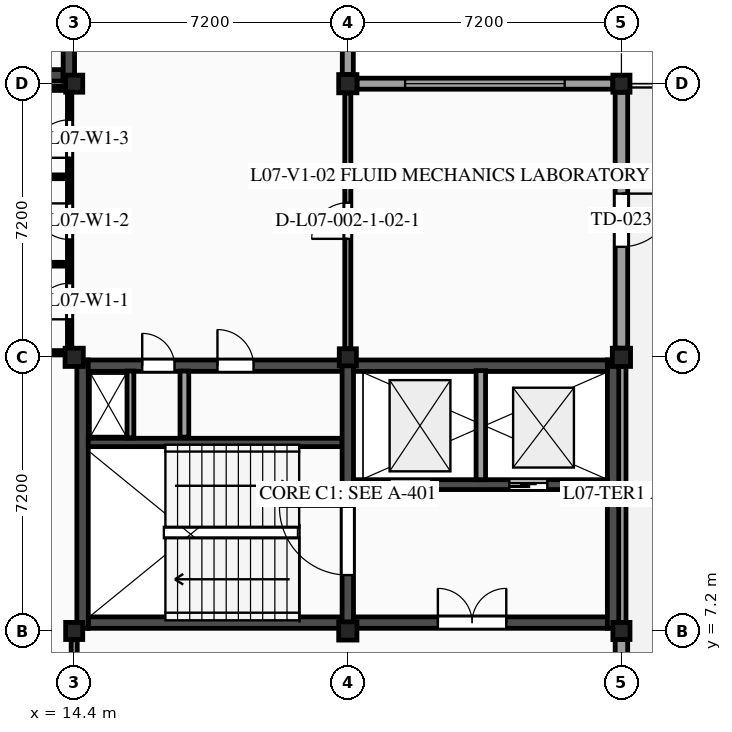
"""IFC4 building model, lengths in metres.
Left out: names, types, materials, properties, quantities, classifications, styles, units other than length and angle.
Written with IfcOpenShell. Run it as: python <this file> out.ifc"""

import sys

from ifc_helpers import new_model, si_unit, direction, frame, frame_2d, origin, origin_2d, place, context, subcontext, project, spatial, rectangle, extrude, element, fill, save


model = new_model("IFC4")
c1 = context("Model", 3, precision=1e-05, world=origin(), true_north=direction((0.0, 1.0)))
c2 = subcontext(c1, "Body", "Model", "MODEL_VIEW")
j1 = project(units=[si_unit("LENGTHUNIT", "METRE"), si_unit("PLANEANGLEUNIT", "RADIAN")], contexts=[c1])
p1 = place(None, origin())
s1 = spatial("IfcSite", under=j1, at=p1, CompositionType="ELEMENT")
p2 = place(p1, origin())
s2 = spatial("IfcBuilding", under=s1, at=p2, CompositionType="ELEMENT")
p3 = place(p2, frame((0.0, 0.0, 30.6)))
s3 = spatial("IfcBuildingStorey", under=s2, at=p3, CompositionType="ELEMENT", Elevation=30.6)
p4 = place(p3, frame((14.4, 7.2, 0.0), z_axis=(0.0, 0.0, 1.0), x_axis=(1.0, 0.0, 0.0)))
e1 = element("IfcColumn", 1, at=p4, inside=s3, PredefinedType="COLUMN", context=c2, shape_type="SweptSolid", body=[
    extrude(rectangle(XDim=0.45, YDim=0.45, at=origin_2d()), origin(), (0.0, 0.0, 1.0), 3.9),
])
p5 = place(p3, frame((14.4, 14.4, 0.0), z_axis=(0.0, 0.0, 1.0), x_axis=(1.0, 0.0, 0.0)))
e2 = element("IfcColumn", 2, at=p5, inside=s3, PredefinedType="COLUMN", context=c2, shape_type="SweptSolid", body=[
    extrude(rectangle(XDim=0.48, YDim=0.48, at=origin_2d()), origin(), (0.0, 0.0, 1.0), 3.9),
])
p6 = place(p3, frame((14.4, 21.6, 0.0), z_axis=(0.0, 0.0, 1.0), x_axis=(1.0, 0.0, 0.0)))
e3 = element("IfcColumn", 3, at=p6, inside=s3, PredefinedType="COLUMN", context=c2, shape_type="SweptSolid", body=[
    extrude(rectangle(XDim=0.45, YDim=0.45, at=origin_2d()), origin(), (0.0, 0.0, 1.0), 3.9),
])
p7 = place(p3, frame((21.6, 7.2, 0.0), z_axis=(0.0, 0.0, 1.0), x_axis=(1.0, 0.0, 0.0)))
e4 = element("IfcColumn", 4, at=p7, inside=s3, PredefinedType="COLUMN", context=c2, shape_type="SweptSolid", body=[
    extrude(rectangle(XDim=0.48, YDim=0.48, at=origin_2d()), origin(), (0.0, 0.0, 1.0), 3.9),
])
p8 = place(p3, frame((21.6, 14.4, 0.0), z_axis=(0.0, 0.0, 1.0), x_axis=(1.0, 0.0, 0.0)))
e5 = element("IfcColumn", 5, at=p8, inside=s3, PredefinedType="COLUMN", context=c2, shape_type="SweptSolid", body=[
    extrude(rectangle(XDim=0.45, YDim=0.45, at=origin_2d()), origin(), (0.0, 0.0, 1.0), 3.9),
])
p9 = place(p3, frame((21.6, 21.6, 0.0), z_axis=(0.0, 0.0, 1.0), x_axis=(1.0, 0.0, 0.0)))
e6 = element("IfcColumn", 6, at=p9, inside=s3, PredefinedType="COLUMN", context=c2, shape_type="SweptSolid", body=[
    extrude(rectangle(XDim=0.48, YDim=0.48, at=origin_2d()), origin(), (0.0, 0.0, 1.0), 3.9),
])
p10 = place(p3, frame((28.8, 7.2, 0.0), z_axis=(0.0, 0.0, 1.0), x_axis=(1.0, 0.0, 0.0)))
e7 = element("IfcColumn", 7, at=p10, inside=s3, PredefinedType="COLUMN", context=c2, shape_type="SweptSolid", body=[
    extrude(rectangle(XDim=0.45, YDim=0.45, at=origin_2d()), origin(), (0.0, 0.0, 1.0), 3.9),
])
p11 = place(p3, frame((28.8, 14.4, 0.0), z_axis=(0.0, 0.0, 1.0), x_axis=(1.0, 0.0, 0.0)))
e8 = element("IfcColumn", 8, at=p11, inside=s3, PredefinedType="COLUMN", context=c2, shape_type="SweptSolid", body=[
    extrude(rectangle(XDim=0.48, YDim=0.48, at=origin_2d()), origin(), (0.0, 0.0, 1.0), 3.9),
])
p12 = place(p3, frame((28.8, 21.6, 0.0), z_axis=(0.0, 0.0, 1.0), x_axis=(1.0, 0.0, 0.0)))
e9 = element("IfcColumn", 9, at=p12, inside=s3, PredefinedType="COLUMN", context=c2, shape_type="SweptSolid", body=[
    extrude(rectangle(XDim=0.45, YDim=0.45, at=origin_2d()), origin(), (0.0, 0.0, 1.0), 3.9),
])
p13 = place(p3, frame((21.6, 28.575, 0.0), z_axis=(0.0, 0.0, 1.0), x_axis=(0.0, -1.0, 0.0)))
e10 = element("IfcWall", 10, at=p13, inside=s3, PredefinedType="STANDARD", context=c2, shape_type="SweptSolid", body=[
    extrude(rectangle(XDim=6.735, YDim=0.29, at=frame_2d((3.367, 0.0))), origin(), (0.0, 0.0, 1.0), 2.88),
])
p14 = place(p13, frame((0.968, 0.0, 0.98)))
e11 = element("IfcOpeningElement", 11, at=p14, cuts=e10, PredefinedType="OPENING", context=c2, shape_type="SweptSolid", body=[
    extrude(rectangle(XDim=4.8, YDim=1.5, at=frame_2d((2.4, 0.75))), frame((0.0, 0.155, 0.0), z_axis=(0.0, -1.0, 0.0), x_axis=(1.0, 0.0, 0.0)), (0.0, 0.0, 1.0), 0.31),
])
p15 = place(p3, frame((21.84, 21.6, 0.0), z_axis=(0.0, 0.0, 1.0), x_axis=(1.0, 0.0, 0.0)))
e12 = element("IfcWall", 12, at=p15, inside=s3, PredefinedType="STANDARD", context=c2, shape_type="SweptSolid", body=[
    extrude(rectangle(XDim=6.735, YDim=0.29, at=frame_2d((3.367, 0.0))), origin(), (0.0, 0.0, 1.0), 2.88),
])
p16 = place(p15, frame((1.268, 0.0, 0.98)))
e13 = element("IfcOpeningElement", 13, at=p16, cuts=e12, PredefinedType="OPENING", context=c2, shape_type="SweptSolid", body=[
    extrude(rectangle(XDim=4.2, YDim=1.5, at=frame_2d((2.1, 0.75))), frame((0.0, 0.155, 0.0), z_axis=(0.0, -1.0, 0.0), x_axis=(1.0, 0.0, 0.0)), (0.0, 0.0, 1.0), 0.31),
])
p17 = place(p3, frame((28.8, 21.375, 0.0), z_axis=(0.0, 0.0, 1.0), x_axis=(0.0, -1.0, 0.0)))
e14 = element("IfcWall", 14, at=p17, inside=s3, PredefinedType="STANDARD", context=c2, shape_type="SweptSolid", body=[
    extrude(rectangle(XDim=6.735, YDim=0.33, at=frame_2d((3.368, 0.0))), origin(), (0.0, 0.0, 1.0), 2.88),
])
p18 = place(p17, frame((2.667, 0.0, 0.0)))
e15 = element("IfcOpeningElement", 15, at=p18, cuts=e14, PredefinedType="OPENING", context=c2, shape_type="SweptSolid", body=[
    extrude(rectangle(XDim=1.4, YDim=2.25, at=frame_2d((0.7, 1.125))), frame((0.0, 0.175, 0.0), z_axis=(0.0, -1.0, 0.0), x_axis=(1.0, 0.0, 0.0)), (0.0, 0.0, 1.0), 0.35),
])
p19 = place(p3, frame((28.8, 14.16, 0.0), z_axis=(0.0, 0.0, 1.0), x_axis=(0.0, -1.0, 0.0)))
e16 = element("IfcWall", 16, at=p19, inside=s3, PredefinedType="STANDARD", context=c2, shape_type="SweptSolid", body=[
    extrude(rectangle(XDim=6.735, YDim=0.24, at=frame_2d((3.367, 0.0))), origin(), (0.0, 0.0, 1.0), 2.88),
])
p20 = place(p3, frame((28.8, 6.975, 0.0), z_axis=(0.0, 0.0, 1.0), x_axis=(0.0, -1.0, 0.0)))
e17 = element("IfcWall", 17, at=p20, inside=s3, PredefinedType="STANDARD", context=c2, shape_type="SweptSolid", body=[
    extrude(rectangle(XDim=6.735, YDim=0.33, at=frame_2d((3.368, 0.0))), origin(), (0.0, 0.0, 1.0), 2.88),
])
p21 = place(p20, frame((2.817, 0.0, 0.0)))
e18 = element("IfcOpeningElement", 18, at=p21, cuts=e17, PredefinedType="OPENING", context=c2, shape_type="SweptSolid", body=[
    extrude(rectangle(XDim=1.1, YDim=2.2, at=frame_2d((0.55, 1.1))), frame((0.0, 0.175, 0.0), z_axis=(0.0, -1.0, 0.0), x_axis=(1.0, 0.0, 0.0)), (0.0, 0.0, 1.0), 0.35),
])
p22 = place(p3, frame((14.77, 7.42, 0.0), z_axis=(0.0, 0.0, 1.0), x_axis=(1.0, 0.0, 0.0)))
e19 = element("IfcWall", 19, at=p22, inside=s3, PredefinedType="SHEAR", context=c2, shape_type="SweptSolid", body=[
    extrude(rectangle(XDim=6.68, YDim=0.3, at=frame_2d((3.34, 0.0))), origin(), (0.0, 0.0, 1.0), 3.685),
])
p23 = place(p3, frame((14.62, 14.33, 0.0), z_axis=(0.0, 0.0, 1.0), x_axis=(0.0, -1.0, 0.0)))
e20 = element("IfcWall", 20, at=p23, inside=s3, PredefinedType="SHEAR", context=c2, shape_type="SweptSolid", body=[
    extrude(rectangle(XDim=7.06, YDim=0.3, at=frame_2d((3.53, 0.0))), origin(), (0.0, 0.0, 1.0), 3.685),
])
p24 = place(p3, frame((14.77, 14.18, 0.0), z_axis=(0.0, 0.0, 1.0), x_axis=(1.0, 0.0, 0.0)))
e21 = element("IfcWall", 21, at=p24, inside=s3, PredefinedType="SHEAR", context=c2, shape_type="SweptSolid", body=[
    extrude(rectangle(XDim=6.68, YDim=0.3, at=frame_2d((3.34, 0.0))), origin(), (0.0, 0.0, 1.0), 3.685),
])
p25 = place(p24, frame((1.42, 0.0, 0.0)))
e22 = element("IfcOpeningElement", 22, at=p25, cuts=e21, PredefinedType="OPENING", context=c2, shape_type="SweptSolid", body=[
    extrude(rectangle(XDim=0.85, YDim=2.1, at=frame_2d((0.425, 1.05))), frame((0.0, 0.16, 0.0), z_axis=(0.0, -1.0, 0.0), x_axis=(1.0, 0.0, 0.0)), (0.0, 0.0, 1.0), 0.32),
])
p26 = place(p24, frame((3.4, 0.0, 0.0)))
e23 = element("IfcOpeningElement", 23, at=p26, cuts=e21, PredefinedType="OPENING", context=c2, shape_type="SweptSolid", body=[
    extrude(rectangle(XDim=0.95, YDim=2.15, at=frame_2d((0.475, 1.075))), frame((0.0, 0.16, 0.0), z_axis=(0.0, -1.0, 0.0), x_axis=(1.0, 0.0, 0.0)), (0.0, 0.0, 1.0), 0.32),
])
p27 = place(p3, frame((14.77, 12.16, 0.0), z_axis=(0.0, 0.0, 1.0), x_axis=(1.0, 0.0, 0.0)))
e24 = element("IfcWall", 24, at=p27, inside=s3, PredefinedType="SHEAR", context=c2, shape_type="SweptSolid", body=[
    extrude(rectangle(XDim=6.68, YDim=0.22, at=frame_2d((3.34, 0.0))), origin(), (0.0, 0.0, 1.0), 3.685),
])
p28 = place(p3, frame((17.3, 12.3, 0.0), z_axis=(0.0, 0.0, 1.0), x_axis=(0.0, 1.0, 0.0)))
e25 = element("IfcWall", 25, at=p28, inside=s3, PredefinedType="PARTITIONING", context=c2, shape_type="SweptSolid", body=[
    extrude(rectangle(XDim=1.74, YDim=0.23, at=frame_2d((0.87, 0.0))), origin(), (0.0, 0.0, 1.0), 3.685),
])
p29 = place(p3, frame((15.88, 12.28, 0.0), z_axis=(0.0, 0.0, 1.0), x_axis=(0.0, 1.0, 0.0)))
e26 = element("IfcWall", 26, at=p29, inside=s3, PredefinedType="PARTITIONING", context=c2, shape_type="SweptSolid", body=[
    extrude(rectangle(XDim=1.76, YDim=0.18, at=frame_2d((0.88, 0.0))), origin(), (0.0, 0.0, 1.0), 3.685),
])
p30 = place(p3, frame((21.6, 7.27, 0.0), z_axis=(0.0, 0.0, 1.0), x_axis=(0.0, 1.0, 0.0)))
e27 = element("IfcWall", 27, at=p30, inside=s3, PredefinedType="SHEAR", context=c2, shape_type="SweptSolid", body=[
    extrude(rectangle(XDim=7.06, YDim=0.3, at=frame_2d((3.53, 0.0))), origin(), (0.0, 0.0, 1.0), 3.685),
])
p31 = place(p30, frame((1.4, 0.0, 0.0)))
e28 = element("IfcOpeningElement", 28, at=p31, cuts=e27, PredefinedType="OPENING", context=c2, shape_type="SweptSolid", body=[
    extrude(rectangle(XDim=1.8, YDim=2.2, at=frame_2d((0.9, 1.1))), frame((0.0, 0.16, 0.0), z_axis=(0.0, -1.0, 0.0), x_axis=(1.0, 0.0, 0.0)), (0.0, 0.0, 1.0), 0.32),
])
p32 = place(p3, frame((21.75, 7.42, 0.0), z_axis=(0.0, 0.0, 1.0), x_axis=(1.0, 0.0, 0.0)))
e29 = element("IfcWall", 29, at=p32, inside=s3, PredefinedType="SHEAR", context=c2, shape_type="SweptSolid", body=[
    extrude(rectangle(XDim=6.68, YDim=0.3, at=frame_2d((3.34, 0.0))), origin(), (0.0, 0.0, 1.0), 3.685),
])
p33 = place(p32, frame((2.22, 0.0, 0.0)))
e30 = element("IfcOpeningElement", 30, at=p33, cuts=e29, PredefinedType="OPENING", context=c2, shape_type="SweptSolid", body=[
    extrude(rectangle(XDim=1.8, YDim=2.2, at=frame_2d((0.9, 1.1))), frame((0.0, 0.16, 0.0), z_axis=(0.0, -1.0, 0.0), x_axis=(1.0, 0.0, 0.0)), (0.0, 0.0, 1.0), 0.32),
])
p34 = place(p3, frame((28.58, 7.27, 0.0), z_axis=(0.0, 0.0, 1.0), x_axis=(0.0, 1.0, 0.0)))
e31 = element("IfcWall", 31, at=p34, inside=s3, PredefinedType="SHEAR", context=c2, shape_type="SweptSolid", body=[
    extrude(rectangle(XDim=7.06, YDim=0.3, at=frame_2d((3.53, 0.0))), origin(), (0.0, 0.0, 1.0), 3.685),
])
p35 = place(p3, frame((21.75, 14.18, 0.0), z_axis=(0.0, 0.0, 1.0), x_axis=(1.0, 0.0, 0.0)))
e32 = element("IfcWall", 32, at=p35, inside=s3, PredefinedType="SHEAR", context=c2, shape_type="SweptSolid", body=[
    extrude(rectangle(XDim=6.68, YDim=0.3, at=frame_2d((3.34, 0.0))), origin(), (0.0, 0.0, 1.0), 3.685),
])
p36 = place(p3, frame((21.75, 11.05, 0.0), z_axis=(0.0, 0.0, 1.0), x_axis=(1.0, 0.0, 0.0)))
e33 = element("IfcWall", 33, at=p36, inside=s3, PredefinedType="SHEAR", context=c2, shape_type="SweptSolid", body=[
    extrude(rectangle(XDim=6.68, YDim=0.26, at=frame_2d((3.34, 0.0))), origin(), (0.0, 0.0, 1.0), 3.685),
])
p37 = place(p36, frame((0.95, 0.0, 0.0)))
e34 = element("IfcOpeningElement", 34, at=p37, cuts=e33, PredefinedType="OPENING", context=c2, shape_type="SweptSolid", body=[
    extrude(rectangle(XDim=1.1, YDim=2.2, at=frame_2d((0.55, 1.1))), frame((0.0, 0.14, 0.0), z_axis=(0.0, -1.0, 0.0), x_axis=(1.0, 0.0, 0.0)), (0.0, 0.0, 1.0), 0.28),
])
p38 = place(p36, frame((4.1, 0.0, 0.0)))
e35 = element("IfcOpeningElement", 35, at=p38, cuts=e33, PredefinedType="OPENING", context=c2, shape_type="SweptSolid", body=[
    extrude(rectangle(XDim=1.0, YDim=2.15, at=frame_2d((0.5, 1.075))), frame((0.0, 0.14, 0.0), z_axis=(0.0, -1.0, 0.0), x_axis=(1.0, 0.0, 0.0)), (0.0, 0.0, 1.0), 0.28),
])
p39 = place(p3, frame((25.1, 11.18, 0.0), z_axis=(0.0, 0.0, 1.0), x_axis=(0.0, 1.0, 0.0)))
e36 = element("IfcWall", 36, at=p39, inside=s3, PredefinedType="PARTITIONING", context=c2, shape_type="SweptSolid", body=[
    extrude(rectangle(XDim=2.87, YDim=0.25, at=frame_2d((1.435, 0.0))), origin(), (0.0, 0.0, 1.0), 3.685),
])
p40 = place(p3, frame((7.57, 21.82, 0.0), z_axis=(0.0, 0.0, 1.0), x_axis=(1.0, 0.0, 0.0)))
e37 = element("IfcWall", 37, at=p40, inside=s3, PredefinedType="SHEAR", context=c2, shape_type="SweptSolid", body=[
    extrude(rectangle(XDim=6.54, YDim=0.3, at=frame_2d((3.27, 0.0))), origin(), (0.0, 0.0, 1.0), 3.685),
])
p41 = place(p3, frame((14.26, 21.67, 0.0), z_axis=(0.0, 0.0, 1.0), x_axis=(0.0, 1.0, 0.0)))
e38 = element("IfcWall", 38, at=p41, inside=s3, PredefinedType="SHEAR", context=c2, shape_type="SweptSolid", body=[
    extrude(rectangle(XDim=7.06, YDim=0.3, at=frame_2d((3.53, 0.0))), origin(), (0.0, 0.0, 1.0), 3.685),
])
p42 = place(p41, frame((5.2, 0.0, 0.0)))
e39 = element("IfcOpeningElement", 39, at=p42, cuts=e38, PredefinedType="OPENING", context=c2, shape_type="SweptSolid", body=[
    extrude(rectangle(XDim=1.35, YDim=2.15, at=frame_2d((0.675, 1.075))), frame((0.0, 0.16, 0.0), z_axis=(0.0, -1.0, 0.0), x_axis=(1.0, 0.0, 0.0)), (0.0, 0.0, 1.0), 0.32),
])
p43 = place(p3, frame((7.43, 14.52, 0.0), z_axis=(0.0, 0.0, 1.0), x_axis=(1.0, 0.0, 0.0)))
e40 = element("IfcWall", 40, at=p43, inside=s3, PredefinedType="PARTITIONING", context=c2, shape_type="SweptSolid", body=[
    extrude(rectangle(XDim=6.725, YDim=0.115, at=frame_2d((3.363, 0.0))), origin(), (0.0, 0.0, 1.0), 3.045),
])
p44 = place(p3, frame((7.445, 21.48, 0.0), z_axis=(0.0, 0.0, 1.0), x_axis=(1.0, 0.0, 0.0)))
e41 = element("IfcWall", 41, at=p44, inside=s3, PredefinedType="PARTITIONING", context=c2, shape_type="SweptSolid", body=[
    extrude(rectangle(XDim=6.725, YDim=0.115, at=frame_2d((3.362, 0.0))), origin(), (0.0, 0.0, 1.0), 3.045),
])
p45 = place(p3, frame((14.28, 14.645, 0.0), z_axis=(0.0, 0.0, 1.0), x_axis=(0.0, 1.0, 0.0)))
e42 = element("IfcWall", 42, at=p45, inside=s3, PredefinedType="PARTITIONING", context=c2, shape_type="SweptSolid", body=[
    extrude(rectangle(XDim=6.725, YDim=0.115, at=frame_2d((3.363, 0.0))), origin(), (0.0, 0.0, 1.0), 3.0),
])
p46 = place(p45, frame((0.755, 0.0, 0.0)))
e43 = element("IfcOpeningElement", 43, at=p46, cuts=e42, PredefinedType="OPENING", context=c2, shape_type="SweptSolid", body=[
    extrude(rectangle(XDim=0.95, YDim=2.1, at=frame_2d((0.475, 1.05))), frame((0.0, 0.067, 0.0), z_axis=(0.0, -1.0, 0.0), x_axis=(1.0, 0.0, 0.0)), (0.0, 0.0, 1.0), 0.135),
])
p47 = place(p45, frame((2.855, 0.0, 0.0)))
e44 = element("IfcOpeningElement", 44, at=p47, cuts=e42, PredefinedType="OPENING", context=c2, shape_type="SweptSolid", body=[
    extrude(rectangle(XDim=0.95, YDim=2.1, at=frame_2d((0.475, 1.05))), frame((0.0, 0.067, 0.0), z_axis=(0.0, -1.0, 0.0), x_axis=(1.0, 0.0, 0.0)), (0.0, 0.0, 1.0), 0.135),
])
p48 = place(p45, frame((5.005, 0.0, 0.0)))
e45 = element("IfcOpeningElement", 45, at=p48, cuts=e42, PredefinedType="OPENING", context=c2, shape_type="SweptSolid", body=[
    extrude(rectangle(XDim=1.0, YDim=2.15, at=frame_2d((0.5, 1.075))), frame((0.0, 0.067, 0.0), z_axis=(0.0, -1.0, 0.0), x_axis=(1.0, 0.0, 0.0)), (0.0, 0.0, 1.0), 0.135),
])
for number, where, z_axis, x_axis in (
    (46, (7.4, 16.85, 0.0), (0.0, 0.0, 1.0), (1.0, 0.0, 0.0)),
    (47, (7.4, 19.15, 0.0), (0.0, 0.0, 1.0), (1.0, 0.0, 0.0)),
):
    element("IfcWall", number, at=place(p3, frame(where, z_axis=z_axis, x_axis=x_axis)), inside=s3, PredefinedType="PARTITIONING", context=c2, shape_type="SweptSolid", body=[
        extrude(rectangle(XDim=6.8, YDim=0.1, at=frame_2d((3.4, 0.0))), origin(), (0.0, 0.0, 1.0), 3.685),
    ])
p49 = place(p3, frame((14.4, 0.245, 0.0), z_axis=(0.0, 0.0, 1.0), x_axis=(0.0, 1.0, 0.0)))
e48 = element("IfcWall", 48, at=p49, inside=s3, PredefinedType="PARTITIONING", context=c2, shape_type="SweptSolid", body=[
    extrude(rectangle(XDim=6.725, YDim=0.16, at=frame_2d((3.362, 0.0))), origin(), (0.0, 0.0, 1.0), 3.05),
])
p50 = place(p49, frame((2.812, 0.0, 0.0)))
e49 = element("IfcOpeningElement", 49, at=p50, cuts=e48, PredefinedType="OPENING", context=c2, shape_type="SweptSolid", body=[
    extrude(rectangle(XDim=1.1, YDim=2.15, at=frame_2d((0.55, 1.075))), frame((0.0, 0.09, 0.0), z_axis=(0.0, -1.0, 0.0), x_axis=(1.0, 0.0, 0.0)), (0.0, 0.0, 1.0), 0.18),
])
p51 = place(p3, frame((21.6, 14.63, 0.0), z_axis=(0.0, 0.0, 1.0), x_axis=(0.0, 1.0, 0.0)))
e50 = element("IfcWall", 50, at=p51, inside=s3, PredefinedType="PARTITIONING", context=c2, shape_type="SweptSolid", body=[
    extrude(rectangle(XDim=6.725, YDim=0.16, at=frame_2d((3.363, 0.0))), origin(), (0.0, 0.0, 1.0), 3.0),
])
p52 = place(p51, frame((2.887, 0.0, 0.0)))
e51 = element("IfcOpeningElement", 51, at=p52, cuts=e50, PredefinedType="OPENING", context=c2, shape_type="SweptSolid", body=[
    extrude(rectangle(XDim=0.95, YDim=2.15, at=frame_2d((0.475, 1.075))), frame((0.0, 0.09, 0.0), z_axis=(0.0, -1.0, 0.0), x_axis=(1.0, 0.0, 0.0)), (0.0, 0.0, 1.0), 0.18),
])
p53 = place(p16, origin())
e52 = element("IfcWindow", 52, at=p53, inside=s3, PartitioningType="SINGLE_PANEL", PredefinedType="WINDOW", context=c2, shape_type="SweptSolid", body=[
    extrude(rectangle(XDim=4.2, YDim=1.5, at=frame_2d((2.1, 0.75))), frame((0.0, -0.03, 0.0), z_axis=(0.0, -1.0, 0.0), x_axis=(1.0, 0.0, 0.0)), (0.0, 0.0, 1.0), 0.06),
])
fill(e13, e52)
p54 = place(p18, origin())
e53 = element("IfcDoor", 53, at=p54, inside=s3, OperationType="SINGLE_SWING_LEFT", PredefinedType="DOOR", context=c2, shape_type="SweptSolid", body=[
    extrude(rectangle(XDim=1.4, YDim=2.25, at=frame_2d((0.7, 1.125))), frame((0.0, 0.025, 0.0), z_axis=(0.0, -1.0, 0.0), x_axis=(1.0, 0.0, 0.0)), (0.0, 0.0, 1.0), 0.05),
])
fill(e15, e53)
p55 = place(p25, origin())
e54 = element("IfcDoor", 54, at=p55, inside=s3, OperationType="SINGLE_SWING_LEFT", PredefinedType="DOOR", context=c2, shape_type="SweptSolid", body=[
    extrude(rectangle(XDim=0.85, YDim=2.1, at=frame_2d((0.425, 1.05))), frame((0.0, 0.025, 0.0), z_axis=(0.0, -1.0, 0.0), x_axis=(1.0, 0.0, 0.0)), (0.0, 0.0, 1.0), 0.05),
])
fill(e22, e54)
p56 = place(p31, origin())
e55 = element("IfcDoor", 55, at=p56, inside=s3, OperationType="SINGLE_SWING_RIGHT", PredefinedType="DOOR", context=c2, shape_type="SweptSolid", body=[
    extrude(rectangle(XDim=1.8, YDim=2.2, at=frame_2d((0.9, 1.1))), frame((0.0, 0.025, 0.0), z_axis=(0.0, -1.0, 0.0), x_axis=(1.0, 0.0, 0.0)), (0.0, 0.0, 1.0), 0.05),
])
fill(e28, e55)
p57 = place(p26, origin())
e56 = element("IfcDoor", 56, at=p57, inside=s3, OperationType="SINGLE_SWING_LEFT", PredefinedType="DOOR", context=c2, shape_type="SweptSolid", body=[
    extrude(rectangle(XDim=0.95, YDim=2.15, at=frame_2d((0.475, 1.075))), frame((0.0, 0.025, 0.0), z_axis=(0.0, -1.0, 0.0), x_axis=(1.0, 0.0, 0.0)), (0.0, 0.0, 1.0), 0.05),
])
fill(e23, e56)
p58 = place(p37, origin())
e57 = element("IfcDoor", 57, at=p58, inside=s3, OperationType="SLIDING_TO_LEFT", PredefinedType="DOOR", context=c2, shape_type="SweptSolid", body=[
    extrude(rectangle(XDim=1.1, YDim=2.2, at=frame_2d((0.55, 1.1))), frame((0.0, 0.025, 0.0), z_axis=(0.0, -1.0, 0.0), x_axis=(1.0, 0.0, 0.0)), (0.0, 0.0, 1.0), 0.05),
])
fill(e34, e57)
p59 = place(p38, origin())
e58 = element("IfcDoor", 58, at=p59, inside=s3, OperationType="SLIDING_TO_RIGHT", PredefinedType="DOOR", context=c2, shape_type="SweptSolid", body=[
    extrude(rectangle(XDim=1.0, YDim=2.15, at=frame_2d((0.5, 1.075))), frame((0.0, 0.025, 0.0), z_axis=(0.0, -1.0, 0.0), x_axis=(1.0, 0.0, 0.0)), (0.0, 0.0, 1.0), 0.05),
])
fill(e35, e58)
p60 = place(p33, origin())
e59 = element("IfcDoor", 59, at=p60, inside=s3, OperationType="DOUBLE_DOOR_SINGLE_SWING", PredefinedType="DOOR", context=c2, shape_type="SweptSolid", body=[
    extrude(rectangle(XDim=1.8, YDim=2.2, at=frame_2d((0.9, 1.1))), frame((0.0, 0.025, 0.0), z_axis=(0.0, -1.0, 0.0), x_axis=(1.0, 0.0, 0.0)), (0.0, 0.0, 1.0), 0.05),
])
fill(e30, e59)
p61 = place(p46, origin())
e60 = element("IfcDoor", 60, at=p61, inside=s3, OperationType="SINGLE_SWING_LEFT", PredefinedType="DOOR", context=c2, shape_type="SweptSolid", body=[
    extrude(rectangle(XDim=0.95, YDim=2.1, at=frame_2d((0.475, 1.05))), frame((0.0, 0.025, 0.0), z_axis=(0.0, -1.0, 0.0), x_axis=(1.0, 0.0, 0.0)), (0.0, 0.0, 1.0), 0.05),
])
fill(e43, e60)
p62 = place(p47, origin())
e61 = element("IfcDoor", 61, at=p62, inside=s3, OperationType="SINGLE_SWING_RIGHT", PredefinedType="DOOR", context=c2, shape_type="SweptSolid", body=[
    extrude(rectangle(XDim=0.95, YDim=2.1, at=frame_2d((0.475, 1.05))), frame((0.0, 0.025, 0.0), z_axis=(0.0, -1.0, 0.0), x_axis=(1.0, 0.0, 0.0)), (0.0, 0.0, 1.0), 0.05),
])
fill(e44, e61)
p63 = place(p48, origin())
e62 = element("IfcDoor", 62, at=p63, inside=s3, OperationType="SINGLE_SWING_LEFT", PredefinedType="DOOR", context=c2, shape_type="SweptSolid", body=[
    extrude(rectangle(XDim=1.0, YDim=2.15, at=frame_2d((0.5, 1.075))), frame((0.0, 0.025, 0.0), z_axis=(0.0, -1.0, 0.0), x_axis=(1.0, 0.0, 0.0)), (0.0, 0.0, 1.0), 0.05),
])
fill(e45, e62)
p64 = place(p52, origin())
e63 = element("IfcDoor", 63, at=p64, inside=s3, OperationType="SINGLE_SWING_LEFT", PredefinedType="DOOR", context=c2, shape_type="SweptSolid", body=[
    extrude(rectangle(XDim=0.95, YDim=2.15, at=frame_2d((0.475, 1.075))), frame((0.0, 0.025, 0.0), z_axis=(0.0, -1.0, 0.0), x_axis=(1.0, 0.0, 0.0)), (0.0, 0.0, 1.0), 0.05),
])
fill(e51, e63)
save(model, sys.argv[1])
